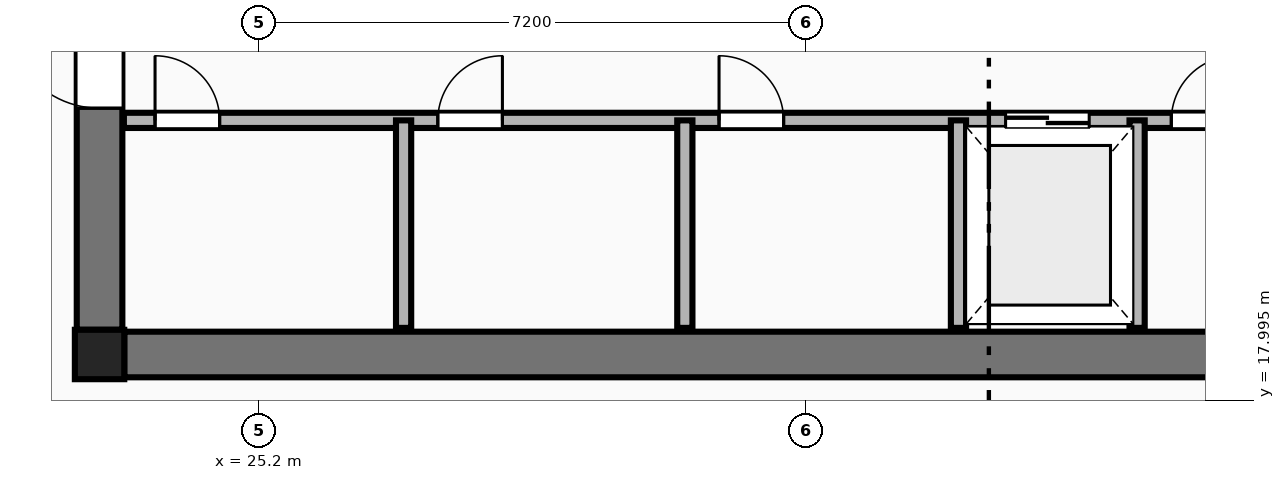
"""IFC4 building model, lengths in metres.
Left out: names, types, materials, properties, quantities, classifications, styles, units other than length and angle.
Written with IfcOpenShell. Run it as: python <this file> out.ifc"""

import sys

from ifc_helpers import new_model, si_unit, direction, frame, frame_2d, origin, origin_2d, place, context, subcontext, project, spatial, rectangle, extrude, element, fill, save


model = new_model("IFC4")
c1 = context("Model", 3, precision=1e-05, world=origin(), true_north=direction((0.0, 1.0)))
c2 = subcontext(c1, "Body", "Model", "MODEL_VIEW")
j1 = project(units=[si_unit("LENGTHUNIT", "METRE"), si_unit("PLANEANGLEUNIT", "RADIAN")], contexts=[c1])
p1 = place(None, origin())
s1 = spatial("IfcSite", under=j1, at=p1, CompositionType="ELEMENT")
p2 = place(p1, origin())
s2 = spatial("IfcBuilding", under=s1, at=p2, CompositionType="ELEMENT")
p3 = place(p2, frame((0.0, 0.0, 153.5)))
s3 = spatial("IfcBuildingStorey", under=s2, at=p3, CompositionType="ELEMENT", Elevation=153.5)
p4 = place(p3, frame((23.1, 18.6, 0.0), z_axis=(0.0, 0.0, 1.0), x_axis=(1.0, 0.0, 0.0)))
e1 = element("IfcColumn", 1, at=p4, inside=s3, PredefinedType="COLUMN", context=c2, shape_type="SweptSolid", body=[
    extrude(rectangle(XDim=0.65, YDim=0.65, at=origin_2d()), origin(), (0.0, 0.0, 1.0), 3.55),
])
p5 = place(p3, frame((23.425, 18.6, 0.0), z_axis=(0.0, 0.0, 1.0), x_axis=(1.0, 0.0, 0.0)))
e2 = element("IfcWall", 2, at=p5, inside=s3, PredefinedType="SHEAR", context=c2, shape_type="SweptSolid", body=[
    extrude(rectangle(XDim=17.95, YDim=0.6, at=frame_2d((8.975, 0.0))), origin(), (0.0, 0.0, 1.0), 3.34),
])
p6 = place(p3, frame((23.1, 18.925, 0.0), z_axis=(0.0, 0.0, 1.0), x_axis=(0.0, 1.0, 0.0)))
e3 = element("IfcWall", 3, at=p6, inside=s3, PredefinedType="SHEAR", context=c2, shape_type="SweptSolid", body=[
    extrude(rectangle(XDim=13.95, YDim=0.6, at=frame_2d((6.975, 0.0))), origin(), (0.0, 0.0, 1.0), 3.34),
])
p7 = place(p6, frame((2.915, 0.0, 0.0)))
e4 = element("IfcOpeningElement", 4, at=p7, cuts=e3, PredefinedType="OPENING", context=c2, shape_type="SweptSolid", body=[
    extrude(rectangle(XDim=1.22, YDim=2.25, at=frame_2d((0.61, 1.125))), frame((0.0, 0.31, 0.0), z_axis=(0.0, -1.0, 0.0), x_axis=(1.0, 0.0, 0.0)), (0.0, 0.0, 1.0), 0.62),
])
p8 = place(p3, frame((23.42, 21.68, 0.0), z_axis=(0.0, 0.0, 1.0), x_axis=(1.0, 0.0, 0.0)))
e5 = element("IfcWall", 5, at=p8, inside=s3, PredefinedType="PLUMBINGWALL", context=c2, shape_type="SweptSolid", body=[
    extrude(rectangle(XDim=17.96, YDim=0.2, at=frame_2d((8.98, 0.0))), origin(), (0.0, 0.0, 1.0), 3.34),
])
p9 = place(p8, frame((11.6, 0.0, 0.0)))
e6 = element("IfcOpeningElement", 6, at=p9, cuts=e5, PredefinedType="OPENING", context=c2, shape_type="SweptSolid", body=[
    extrude(rectangle(XDim=1.1, YDim=2.2, at=frame_2d((0.55, 1.1))), frame((0.0, 0.11, 0.0), z_axis=(0.0, -1.0, 0.0), x_axis=(1.0, 0.0, 0.0)), (0.0, 0.0, 1.0), 0.22),
])
p10 = place(p8, frame((0.41, 0.0, 0.0)))
e7 = element("IfcOpeningElement", 7, at=p10, cuts=e5, PredefinedType="OPENING", context=c2, shape_type="SweptSolid", body=[
    extrude(rectangle(XDim=0.85, YDim=2.05, at=frame_2d((0.425, 1.025))), frame((0.0, 0.11, 0.0), z_axis=(0.0, -1.0, 0.0), x_axis=(1.0, 0.0, 0.0)), (0.0, 0.0, 1.0), 0.22),
])
p11 = place(p8, frame((4.13, 0.0, 0.0)))
e8 = element("IfcOpeningElement", 8, at=p11, cuts=e5, PredefinedType="OPENING", context=c2, shape_type="SweptSolid", body=[
    extrude(rectangle(XDim=0.85, YDim=2.05, at=frame_2d((0.425, 1.025))), frame((0.0, 0.11, 0.0), z_axis=(0.0, -1.0, 0.0), x_axis=(1.0, 0.0, 0.0)), (0.0, 0.0, 1.0), 0.22),
])
p12 = place(p8, frame((7.83, 0.0, 0.0)))
e9 = element("IfcOpeningElement", 9, at=p12, cuts=e5, PredefinedType="OPENING", context=c2, shape_type="SweptSolid", body=[
    extrude(rectangle(XDim=0.85, YDim=2.05, at=frame_2d((0.425, 1.025))), frame((0.0, 0.11, 0.0), z_axis=(0.0, -1.0, 0.0), x_axis=(1.0, 0.0, 0.0)), (0.0, 0.0, 1.0), 0.22),
])
p13 = place(p8, frame((13.78, 0.0, 0.0)))
e10 = element("IfcOpeningElement", 10, at=p13, cuts=e5, PredefinedType="OPENING", context=c2, shape_type="SweptSolid", body=[
    extrude(rectangle(XDim=0.85, YDim=2.05, at=frame_2d((0.425, 1.025))), frame((0.0, 0.11, 0.0), z_axis=(0.0, -1.0, 0.0), x_axis=(1.0, 0.0, 0.0)), (0.0, 0.0, 1.0), 0.22),
])
p14 = place(p8, frame((16.13, 0.0, 0.0)))
e11 = element("IfcOpeningElement", 11, at=p14, cuts=e5, PredefinedType="OPENING", context=c2, shape_type="SweptSolid", body=[
    extrude(rectangle(XDim=0.85, YDim=2.05, at=frame_2d((0.425, 1.025))), frame((0.0, 0.11, 0.0), z_axis=(0.0, -1.0, 0.0), x_axis=(1.0, 0.0, 0.0)), (0.0, 0.0, 1.0), 0.22),
])
for number, where, z_axis, x_axis in (
    (12, (34.4, 18.95, 0.0), (0.0, 0.0, 1.0), (0.0, 1.0, 0.0)),
    (13, (36.75, 18.95, 0.0), (0.0, 0.0, 1.0), (0.0, 1.0, 0.0)),
    (14, (27.1, 18.95, 0.0), (0.0, 0.0, 1.0), (0.0, 1.0, 0.0)),
    (15, (30.8, 18.95, 0.0), (0.0, 0.0, 1.0), (0.0, 1.0, 0.0)),
):
    element("IfcWall", number, at=place(p3, frame(where, z_axis=z_axis, x_axis=x_axis)), inside=s3, PredefinedType="PLUMBINGWALL", context=c2, shape_type="SweptSolid", body=[
        extrude(rectangle(XDim=2.73, YDim=0.2, at=frame_2d((1.365, 0.0))), origin(), (0.0, 0.0, 1.0), 3.34),
    ])
p15 = place(p7, origin())
e16 = element("IfcDoor", 16, at=p15, inside=s3, OperationType="SINGLE_SWING_RIGHT", PredefinedType="DOOR", context=c2, shape_type="SweptSolid", body=[
    extrude(rectangle(XDim=1.22, YDim=2.25, at=frame_2d((0.61, 1.125))), frame((0.0, 0.025, 0.0), z_axis=(0.0, -1.0, 0.0), x_axis=(1.0, 0.0, 0.0)), (0.0, 0.0, 1.0), 0.05),
])
fill(e4, e16)
p16 = place(p9, origin())
e17 = element("IfcDoor", 17, at=p16, inside=s3, OperationType="DOUBLE_DOOR_SLIDING", PredefinedType="DOOR", context=c2, shape_type="SweptSolid", body=[
    extrude(rectangle(XDim=1.1, YDim=2.2, at=frame_2d((0.55, 1.1))), frame((0.0, 0.025, 0.0), z_axis=(0.0, -1.0, 0.0), x_axis=(1.0, 0.0, 0.0)), (0.0, 0.0, 1.0), 0.05),
])
fill(e6, e17)
p17 = place(p10, origin())
e18 = element("IfcDoor", 18, at=p17, inside=s3, OperationType="SINGLE_SWING_LEFT", PredefinedType="DOOR", context=c2, shape_type="SweptSolid", body=[
    extrude(rectangle(XDim=0.85, YDim=2.05, at=frame_2d((0.425, 1.025))), frame((0.0, 0.025, 0.0), z_axis=(0.0, -1.0, 0.0), x_axis=(1.0, 0.0, 0.0)), (0.0, 0.0, 1.0), 0.05),
])
fill(e7, e18)
p18 = place(p11, origin())
e19 = element("IfcDoor", 19, at=p18, inside=s3, OperationType="SINGLE_SWING_RIGHT", PredefinedType="DOOR", context=c2, shape_type="SweptSolid", body=[
    extrude(rectangle(XDim=0.85, YDim=2.05, at=frame_2d((0.425, 1.025))), frame((0.0, 0.025, 0.0), z_axis=(0.0, -1.0, 0.0), x_axis=(1.0, 0.0, 0.0)), (0.0, 0.0, 1.0), 0.05),
])
fill(e8, e19)
p19 = place(p12, origin())
e20 = element("IfcDoor", 20, at=p19, inside=s3, OperationType="SINGLE_SWING_LEFT", PredefinedType="DOOR", context=c2, shape_type="SweptSolid", body=[
    extrude(rectangle(XDim=0.85, YDim=2.05, at=frame_2d((0.425, 1.025))), frame((0.0, 0.025, 0.0), z_axis=(0.0, -1.0, 0.0), x_axis=(1.0, 0.0, 0.0)), (0.0, 0.0, 1.0), 0.05),
])
fill(e9, e20)
p20 = place(p13, origin())
e21 = element("IfcDoor", 21, at=p20, inside=s3, OperationType="SINGLE_SWING_RIGHT", PredefinedType="DOOR", context=c2, shape_type="SweptSolid", body=[
    extrude(rectangle(XDim=0.85, YDim=2.05, at=frame_2d((0.425, 1.025))), frame((0.0, 0.025, 0.0), z_axis=(0.0, -1.0, 0.0), x_axis=(1.0, 0.0, 0.0)), (0.0, 0.0, 1.0), 0.05),
])
fill(e10, e21)
save(model, sys.argv[1])
